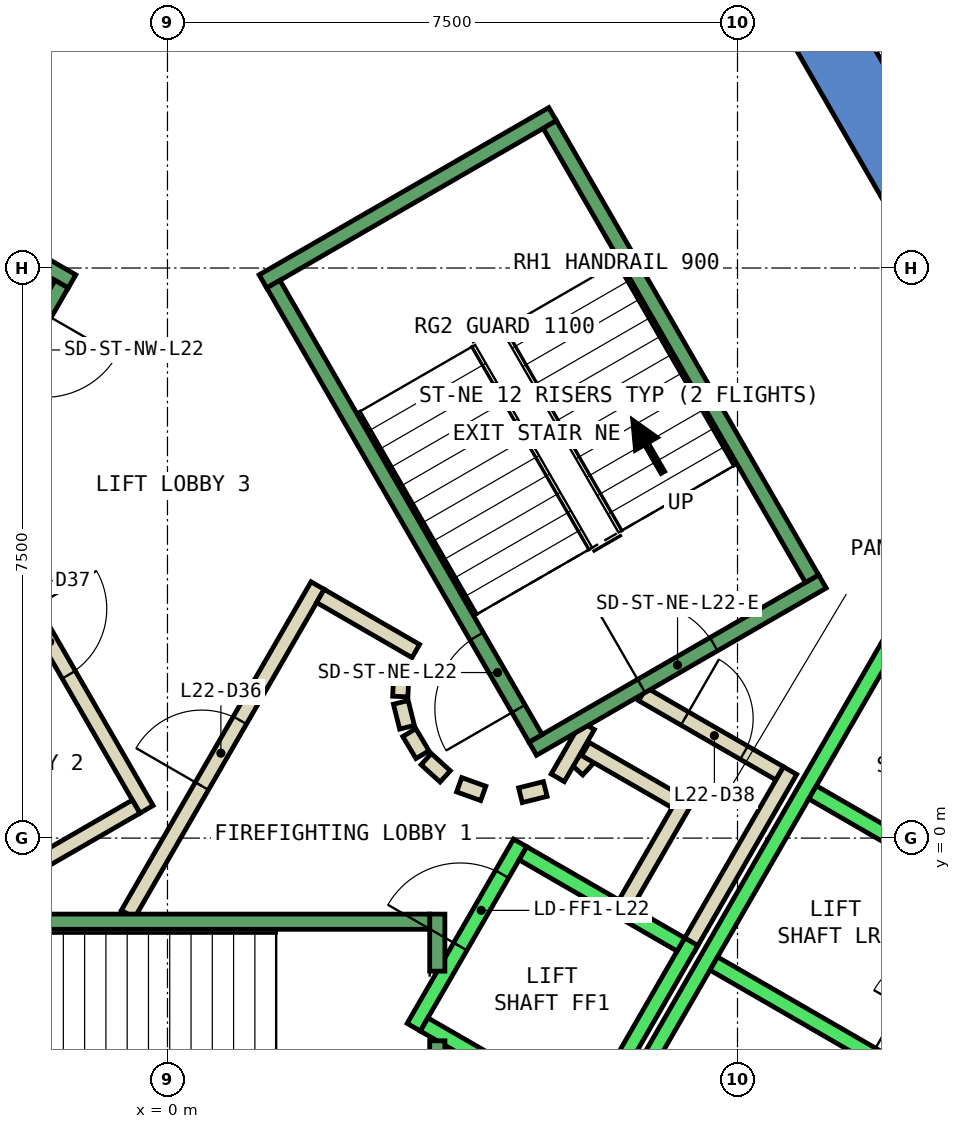
"""IFC4 building model, lengths in metres.
Left out: names, types, materials, properties, quantities, classifications, styles, units other than length and angle.
Written with IfcOpenShell. Run it as: python <this file> out.ifc"""

import sys

from ifc_helpers import new_model, si_unit, direction, frame, frame_2d, origin, place, context, subcontext, project, spatial, polyline, rectangle, outline, extrude, element, fill, save


model = new_model("IFC4")
c1 = context("Model", 3, precision=1e-05, world=origin(), true_north=direction((0.0, 1.0)))
c2 = subcontext(c1, "Body", "Model", "MODEL_VIEW")
j1 = project(units=[si_unit("LENGTHUNIT", "METRE"), si_unit("PLANEANGLEUNIT", "RADIAN")], contexts=[c1])
p1 = place(None, origin())
s1 = spatial("IfcSite", under=j1, at=p1, CompositionType="ELEMENT")
p2 = place(p1, origin())
s2 = spatial("IfcBuilding", under=s1, at=p2, CompositionType="ELEMENT")
p3 = place(p2, frame((0.0, 0.0, 103.4)))
s3 = spatial("IfcBuildingStorey", under=s2, at=p3, CompositionType="ELEMENT", Elevation=103.4)
p4 = place(p3, frame((0.0, 0.0, -0.4)))
e1 = element("IfcWall", 1, at=p4, inside=s3, PredefinedType="SHEAR", context=c2, shape_type="SweptSolid", body=[
    extrude(outline(polyline([(8.517, 11.748), (7.738, 11.298), (12.817, 2.5), (13.856, 2.5), (8.517, 11.748)])), origin(), (0.0, 0.0, 1.0), 4.2),
])
p5 = place(p3, frame((0.0, 0.0, -0.4)))
e2 = element("IfcWall", 2, at=p5, inside=s3, PredefinedType="SHEAR", context=c2, shape_type="SweptSolid", body=[
    extrude(outline(polyline([(10.717, -2.937), (9.938, -2.487), (9.288, -3.613), (10.067, -4.063), (10.717, -2.937)])), origin(), (0.0, 0.0, 1.0), 4.2),
])
p6 = place(p3, frame((5.39, 0.898, 0.0), z_axis=(0.0, 0.0, 1.0), x_axis=(0.673828488714, 0.738887791073, 0.0)))
e3 = element("IfcWall", 3, at=p6, inside=s3, PredefinedType="PARTITIONING", context=c2, shape_type="SweptSolid", body=[
    extrude(rectangle(XDim=0.263, YDim=0.2, at=frame_2d((0.131, 0.0))), origin(), (0.0, 0.0, 1.0), 3.8),
])
p7 = place(p3, frame((5.499, 1.172, 0.0), z_axis=(0.0, 0.0, 1.0), x_axis=(0.866333505267, -0.499465972466, 0.0)))
e4 = element("IfcWall", 4, at=p7, inside=s3, PredefinedType="PARTITIONING", context=c2, shape_type="SweptSolid", body=[
    extrude(rectangle(XDim=1.374, YDim=0.2, at=frame_2d((0.687, 0.0))), origin(), (0.0, 0.0, 1.0), 3.8),
])
p8 = place(p3, frame((6.826, 0.522, 0.0), z_axis=(0.0, 0.0, 1.0), x_axis=(-0.500016722714, -0.866015748706, 0.0)))
e5 = element("IfcWall", 5, at=p8, inside=s3, PredefinedType="PARTITIONING", context=c2, shape_type="SweptSolid", body=[
    extrude(rectangle(XDim=1.7, YDim=0.2, at=frame_2d((0.85, 0.0))), origin(), (0.0, 0.0, 1.0), 3.8),
])
p9 = place(p3, frame((6.25, 1.894, 0.0), z_axis=(0.0, 0.0, 1.0), x_axis=(0.866043184279, -0.499969202016, 0.0)))
e6 = element("IfcWall", 6, at=p9, inside=s3, PredefinedType="PARTITIONING", context=c2, shape_type="SweptSolid", body=[
    extrude(rectangle(XDim=2.084, YDim=0.2, at=frame_2d((1.042, 0.0))), origin(), (0.0, 0.0, 1.0), 3.8),
])
p10 = place(p9, frame((0.642, 0.0, 0.0)))
e7 = element("IfcOpeningElement", 7, at=p10, cuts=e6, PredefinedType="OPENING", context=c2, shape_type="SweptSolid", body=[
    extrude(rectangle(XDim=0.9, YDim=2.1, at=frame_2d((0.45, 1.05))), frame((0.0, 0.11, 0.0), z_axis=(0.0, -1.0, 0.0), x_axis=(1.0, 0.0, 0.0)), (0.0, 0.0, 1.0), 0.22),
])
p11 = place(p3, frame((8.192, 0.888, 0.0), z_axis=(0.0, 0.0, 1.0), x_axis=(-0.499940625693, -0.866059680843, 0.0)))
e8 = element("IfcWall", 8, at=p11, inside=s3, PredefinedType="PARTITIONING", context=c2, shape_type="SweptSolid", body=[
    extrude(rectangle(XDim=2.68, YDim=0.2, at=frame_2d((1.34, 0.0))), origin(), (0.0, 0.0, 1.0), 3.8),
])
p12 = place(p3, frame((5.135, 0.793, 0.0), z_axis=(0.0, 0.0, 1.0), x_axis=(0.499526442893, 0.866298639529, 0.0)))
e9 = element("IfcWall", 9, at=p12, inside=s3, PredefinedType="PARTITIONING", context=c2, shape_type="SweptSolid", body=[
    extrude(rectangle(XDim=0.791, YDim=0.2, at=frame_2d((0.396, 0.0))), origin(), (0.0, 0.0, 1.0), 3.8),
])
p13 = place(p3, frame((-0.52, -1.0, 0.0), z_axis=(0.0, 0.0, 1.0), x_axis=(0.50011622646, 0.865958290007, 0.0)))
e10 = element("IfcWall", 10, at=p13, inside=s3, PredefinedType="PARTITIONING", context=c2, shape_type="SweptSolid", body=[
    extrude(rectangle(XDim=4.991, YDim=0.2, at=frame_2d((2.496, 0.0))), origin(), (0.0, 0.0, 1.0), 3.8),
])
p14 = place(p13, frame((1.945, 0.0, 0.0)))
e11 = element("IfcOpeningElement", 11, at=p14, cuts=e10, PredefinedType="OPENING", context=c2, shape_type="SweptSolid", body=[
    extrude(rectangle(XDim=1.0, YDim=2.1, at=frame_2d((0.5, 1.05))), frame((0.0, 0.11, 0.0), z_axis=(0.0, -1.0, 0.0), x_axis=(1.0, 0.0, 0.0)), (0.0, 0.0, 1.0), 0.22),
])
p15 = place(p3, frame((2.012, 3.186, 0.0), z_axis=(0.0, 0.0, 1.0), x_axis=(0.865891012941, -0.500232699559, 0.0)))
e12 = element("IfcWall", 12, at=p15, inside=s3, PredefinedType="PARTITIONING", context=c2, shape_type="SweptSolid", body=[
    extrude(rectangle(XDim=1.449, YDim=0.2, at=frame_2d((0.725, 0.0))), origin(), (0.0, 0.0, 1.0), 3.8),
])
p16 = place(p3, frame((3.079, 2.199, 0.0), z_axis=(0.0, 0.0, 1.0), x_axis=(-0.047771483479, -0.998858290933, 0.0)))
e13 = element("IfcWall", 13, at=p16, inside=s3, PredefinedType="PARTITIONING", context=c2, shape_type="SweptSolid", body=[
    extrude(rectangle(XDim=0.337, YDim=0.2, at=frame_2d((0.169, 0.0))), origin(), (0.0, 0.0, 1.0), 3.8),
])
p17 = place(p3, frame((3.07, 1.786, 0.0), z_axis=(0.0, 0.0, 1.0), x_axis=(0.242705583207, -0.970099994784, 0.0)))
e14 = element("IfcWall", 14, at=p17, inside=s3, PredefinedType="PARTITIONING", context=c2, shape_type="SweptSolid", body=[
    extrude(rectangle(XDim=0.338, YDim=0.2, at=frame_2d((0.169, 0.0))), origin(), (0.0, 0.0, 1.0), 3.8),
])
for number, where, z_axis, x_axis in (
    (15, (3.182, 1.388, 0.0), (0.0, 0.0, 1.0), (0.512, -0.859, 0.0)),
    (16, (3.404, 1.039, 0.0), (0.0, 0.0, 1.0), (0.74, -0.672, 0.0)),
):
    element("IfcWall", number, at=place(p3, frame(where, z_axis=z_axis, x_axis=x_axis)), inside=s3, PredefinedType="PARTITIONING", context=c2, shape_type="SweptSolid", body=[
        extrude(rectangle(XDim=0.338, YDim=0.2, at=frame_2d((0.169, 0.0))), origin(), (0.0, 0.0, 1.0), 3.8),
    ])
p18 = place(p3, frame((3.838, 0.702, 0.0), z_axis=(0.0, 0.0, 1.0), x_axis=(0.941035081519, -0.338308993895, 0.0)))
e17 = element("IfcWall", 17, at=p18, inside=s3, PredefinedType="PARTITIONING", context=c2, shape_type="SweptSolid", body=[
    extrude(rectangle(XDim=0.337, YDim=0.2, at=frame_2d((0.168, 0.0))), origin(), (0.0, 0.0, 1.0), 3.8),
])
p19 = place(p3, frame((4.644, 0.564, 0.0), z_axis=(0.0, 0.0, 1.0), x_axis=(0.969929076366, 0.243387729394, 0.0)))
e18 = element("IfcWall", 18, at=p19, inside=s3, PredefinedType="PARTITIONING", context=c2, shape_type="SweptSolid", body=[
    extrude(rectangle(XDim=0.337, YDim=0.2, at=frame_2d((0.168, 0.0))), origin(), (0.0, 0.0, 1.0), 3.8),
])
p20 = place(p3, frame((-2.771, 4.7, 0.0), z_axis=(0.0, 0.0, 1.0), x_axis=(0.499969479948, -0.866043023828, 0.0)))
e19 = element("IfcWall", 19, at=p20, inside=s3, PredefinedType="PARTITIONING", context=c2, shape_type="SweptSolid", body=[
    extrude(rectangle(XDim=4.99, YDim=0.2, at=frame_2d((2.495, 0.0))), origin(), (0.0, 0.0, 1.0), 3.8),
])
p21 = place(p20, frame((1.945, 0.0, 0.0)))
e20 = element("IfcOpeningElement", 20, at=p21, cuts=e19, PredefinedType="OPENING", context=c2, shape_type="SweptSolid", body=[
    extrude(rectangle(XDim=1.0, YDim=2.1, at=frame_2d((0.5, 1.05))), frame((0.0, 0.11, 0.0), z_axis=(0.0, -1.0, 0.0), x_axis=(1.0, 0.0, 0.0)), (0.0, 0.0, 1.0), 0.22),
])
p22 = place(p3, frame((-0.412, 0.414, 0.0), z_axis=(0.0, 0.0, 1.0), x_axis=(-0.866017369001, -0.500013916395, 0.0)))
e21 = element("IfcWall", 21, at=p22, inside=s3, PredefinedType="PARTITIONING", context=c2, shape_type="SweptSolid", body=[
    extrude(rectangle(XDim=1.45, YDim=0.2, at=frame_2d((0.725, 0.0))), origin(), (0.0, 0.0, 1.0), 3.8),
])
p23 = place(p3, frame((3.24, -2.488, 0.0), z_axis=(0.0, 0.0, 1.0), x_axis=(0.49994636267, 0.866056369097, 0.0)))
e22 = element("IfcWall", 22, at=p23, inside=s3, PredefinedType="STANDARD", context=c2, shape_type="SweptSolid", body=[
    extrude(rectangle(XDim=2.8, YDim=0.2, at=frame_2d((1.4, 0.0))), origin(), (0.0, 0.0, 1.0), 3.8),
])
p24 = place(p23, frame((1.225, 0.0, 0.0)))
e23 = element("IfcOpeningElement", 23, at=p24, cuts=e22, PredefinedType="OPENING", context=c2, shape_type="SweptSolid", body=[
    extrude(rectangle(XDim=1.1, YDim=2.1, at=frame_2d((0.55, 1.05))), frame((0.0, 0.11, 0.0), z_axis=(0.0, -1.0, 0.0), x_axis=(1.0, 0.0, 0.0)), (0.0, 0.0, 1.0), 0.22),
])
p25 = place(p3, frame((5.492, -3.788, 0.0), z_axis=(0.0, 0.0, 1.0), x_axis=(0.500011755427, 0.866018616679, 0.0)))
e24 = element("IfcWall", 24, at=p25, inside=s3, PredefinedType="STANDARD", context=c2, shape_type="SweptSolid", body=[
    extrude(rectangle(XDim=2.8, YDim=0.2, at=frame_2d((1.4, 0.0))), origin(), (0.0, 0.0, 1.0), 3.8),
])
p26 = place(p3, frame((3.377, -2.452, 0.0), z_axis=(0.0, 0.0, 1.0), x_axis=(0.865955154139, -0.50012165622, 0.0)))
e25 = element("IfcWall", 25, at=p26, inside=s3, PredefinedType="STANDARD", context=c2, shape_type="SweptSolid", body=[
    extrude(rectangle(XDim=2.4, YDim=0.2, at=frame_2d((1.2, 0.0))), origin(), (0.0, 0.0, 1.0), 3.8),
])
p27 = place(p3, frame((4.677, -0.2, 0.0), z_axis=(0.0, 0.0, 1.0), x_axis=(0.865973769406, -0.500089422704, 0.0)))
e26 = element("IfcWall", 26, at=p27, inside=s3, PredefinedType="STANDARD", context=c2, shape_type="SweptSolid", body=[
    extrude(rectangle(XDim=2.399, YDim=0.2, at=frame_2d((1.2, 0.0))), origin(), (0.0, 0.0, 1.0), 3.8),
])
p28 = place(p3, frame((4.451, -6.19, 0.0), z_axis=(0.0, 0.0, 1.0), x_axis=(0.50000090737, 0.866024879913, 0.0)))
e27 = element("IfcWall", 27, at=p28, inside=s3, PredefinedType="STANDARD", context=c2, shape_type="SweptSolid", body=[
    extrude(rectangle(XDim=10.6, YDim=0.2, at=frame_2d((5.3, 0.0))), origin(), (0.0, 0.0, 1.0), 3.8),
])
for number, where, z_axis, x_axis in (
    (28, (7.188, -1.65, 0.0), (0.0, 0.0, 1.0), (0.866, -0.5, 0.0)),
    (29, (8.488, 0.602, 0.0), (0.0, 0.0, 1.0), (0.866, -0.5, 0.0)),
):
    element("IfcWall", number, at=place(p3, frame(where, z_axis=z_axis, x_axis=x_axis)), inside=s3, PredefinedType="STANDARD", context=c2, shape_type="SweptSolid", body=[
        extrude(rectangle(XDim=2.5, YDim=0.2, at=frame_2d((1.25, 0.0))), origin(), (0.0, 0.0, 1.0), 3.8),
    ])
p29 = place(p3, frame((3.55, -2.667, 0.0), z_axis=(0.0, 0.0, 1.0), x_axis=(0.0, -1.0, 0.0)))
e30 = element("IfcWall", 30, at=p29, inside=s3, PredefinedType="STANDARD", context=c2, shape_type="SweptSolid", body=[
    extrude(rectangle(XDim=2.733, YDim=0.2, at=frame_2d((1.366, 0.0))), origin(), (0.0, 0.0, 1.0), 3.8),
])
p30 = place(p3, frame((3.55, -1.0, 0.0), z_axis=(0.0, 0.0, 1.0), x_axis=(0.0, -1.0, 0.0)))
e31 = element("IfcWall", 31, at=p30, inside=s3, PredefinedType="STANDARD", context=c2, shape_type="SweptSolid", body=[
    extrude(rectangle(XDim=0.751, YDim=0.2, at=frame_2d((0.375, 0.0))), origin(), (0.0, 0.0, 1.0), 3.8),
])
p31 = place(p3, frame((-3.45, -1.1, 0.0), z_axis=(0.0, 0.0, 1.0), x_axis=(1.0, 0.0, 0.0)))
e32 = element("IfcWall", 32, at=p31, inside=s3, PredefinedType="STANDARD", context=c2, shape_type="SweptSolid", body=[
    extrude(rectangle(XDim=6.9, YDim=0.2, at=frame_2d((3.45, 0.0))), origin(), (0.0, 0.0, 1.0), 3.8),
])
p32 = place(p31, frame((0.45, 0.0, 0.0)))
e33 = element("IfcOpeningElement", 33, at=p32, cuts=e32, PredefinedType="OPENING", context=c2, shape_type="SweptSolid", body=[
    extrude(rectangle(XDim=1.1, YDim=2.2, at=frame_2d((0.55, 1.1))), frame((0.0, 0.11, 0.0), z_axis=(0.0, -1.0, 0.0), x_axis=(1.0, 0.0, 0.0)), (0.0, 0.0, 1.0), 0.22),
])
p33 = place(p3, frame((4.806, 1.176, 0.0), z_axis=(0.0, 0.0, 1.0), x_axis=(0.866059941101, 0.499940174841, 0.0)))
e34 = element("IfcWall", 34, at=p33, inside=s3, PredefinedType="STANDARD", context=c2, shape_type="SweptSolid", body=[
    extrude(rectangle(XDim=4.4, YDim=0.2, at=frame_2d((2.2, 0.0))), origin(), (0.0, 0.0, 1.0), 3.8),
])
p34 = place(p33, frame((1.65, 0.0, 0.0)))
e35 = element("IfcOpeningElement", 35, at=p34, cuts=e34, PredefinedType="OPENING", context=c2, shape_type="SweptSolid", body=[
    extrude(rectangle(XDim=1.1, YDim=2.2, at=frame_2d((0.55, 1.1))), frame((0.0, 0.11, 0.0), z_axis=(0.0, -1.0, 0.0), x_axis=(1.0, 0.0, 0.0)), (0.0, 0.0, 1.0), 0.22),
])
p35 = place(p3, frame((1.256, 7.324, 0.0), z_axis=(0.0, 0.0, 1.0), x_axis=(0.866046073146, 0.499964197906, 0.0)))
e36 = element("IfcWall", 36, at=p35, inside=s3, PredefinedType="STANDARD", context=c2, shape_type="SweptSolid", body=[
    extrude(rectangle(XDim=4.4, YDim=0.2, at=frame_2d((2.2, 0.0))), origin(), (0.0, 0.0, 1.0), 3.8),
])
p36 = place(p3, frame((4.843, 1.312, 0.0), z_axis=(0.0, 0.0, 1.0), x_axis=(-0.499963383562, 0.866046543262, 0.0)))
e37 = element("IfcWall", 37, at=p36, inside=s3, PredefinedType="STANDARD", context=c2, shape_type="SweptSolid", body=[
    extrude(rectangle(XDim=6.9, YDim=0.2, at=frame_2d((3.45, 0.0))), origin(), (0.0, 0.0, 1.0), 3.8),
])
p37 = place(p36, frame((0.45, 0.0, 0.0)))
e38 = element("IfcOpeningElement", 38, at=p37, cuts=e37, PredefinedType="OPENING", context=c2, shape_type="SweptSolid", body=[
    extrude(rectangle(XDim=1.1, YDim=2.2, at=frame_2d((0.55, 1.1))), frame((0.0, 0.11, 0.0), z_axis=(0.0, -1.0, 0.0), x_axis=(1.0, 0.0, 0.0)), (0.0, 0.0, 1.0), 0.22),
])
p38 = place(p3, frame((8.48, 3.412, 0.0), z_axis=(0.0, 0.0, 1.0), x_axis=(-0.499978703459, 0.866037698999, 0.0)))
e39 = element("IfcWall", 39, at=p38, inside=s3, PredefinedType="STANDARD", context=c2, shape_type="SweptSolid", body=[
    extrude(rectangle(XDim=6.9, YDim=0.2, at=frame_2d((3.45, 0.0))), origin(), (0.0, 0.0, 1.0), 3.8),
])
p39 = place(p3, frame((-1.256, 7.324, 0.0), z_axis=(0.0, 0.0, 1.0), x_axis=(-0.866046073146, 0.499964197906, 0.0)))
e40 = element("IfcWall", 40, at=p39, inside=s3, PredefinedType="STANDARD", context=c2, shape_type="SweptSolid", body=[
    extrude(rectangle(XDim=4.4, YDim=0.2, at=frame_2d((2.2, 0.0))), origin(), (0.0, 0.0, 1.0), 3.8),
])
p40 = place(p39, frame((1.65, 0.0, 0.0)))
e41 = element("IfcOpeningElement", 41, at=p40, cuts=e40, PredefinedType="OPENING", context=c2, shape_type="SweptSolid", body=[
    extrude(rectangle(XDim=1.1, YDim=2.2, at=frame_2d((0.55, 1.1))), frame((0.0, 0.11, 0.0), z_axis=(0.0, -1.0, 0.0), x_axis=(1.0, 0.0, 0.0)), (0.0, 0.0, 1.0), 0.22),
])
p41 = place(p3, frame((-1.393, 7.288, 0.0), z_axis=(0.0, 0.0, 1.0), x_axis=(-0.499963383562, -0.866046543262, 0.0)))
e42 = element("IfcWall", 42, at=p41, inside=s3, PredefinedType="STANDARD", context=c2, shape_type="SweptSolid", body=[
    extrude(rectangle(XDim=6.9, YDim=0.2, at=frame_2d((3.45, 0.0))), origin(), (0.0, 0.0, 1.0), 3.8),
])
p42 = place(p41, frame((0.45, 0.0, 0.0)))
e43 = element("IfcOpeningElement", 43, at=p42, cuts=e42, PredefinedType="OPENING", context=c2, shape_type="SweptSolid", body=[
    extrude(rectangle(XDim=1.1, YDim=2.2, at=frame_2d((0.55, 1.1))), frame((0.0, 0.11, 0.0), z_axis=(0.0, -1.0, 0.0), x_axis=(1.0, 0.0, 0.0)), (0.0, 0.0, 1.0), 0.22),
])
p43 = place(p14, origin())
e44 = element("IfcDoor", 44, at=p43, inside=s3, OperationType="SINGLE_SWING_LEFT", PredefinedType="DOOR", context=c2, shape_type="SweptSolid", body=[
    extrude(rectangle(XDim=1.0, YDim=2.1, at=frame_2d((0.5, 1.05))), frame((0.0, 0.025, 0.0), z_axis=(0.0, -1.0, 0.0), x_axis=(1.0, 0.0, 0.0)), (0.0, 0.0, 1.0), 0.05),
])
fill(e11, e44)
p44 = place(p21, origin())
e45 = element("IfcDoor", 45, at=p44, inside=s3, OperationType="SINGLE_SWING_RIGHT", PredefinedType="DOOR", context=c2, shape_type="SweptSolid", body=[
    extrude(rectangle(XDim=1.0, YDim=2.1, at=frame_2d((0.5, 1.05))), frame((0.0, 0.025, 0.0), z_axis=(0.0, -1.0, 0.0), x_axis=(1.0, 0.0, 0.0)), (0.0, 0.0, 1.0), 0.05),
])
fill(e20, e45)
p45 = place(p10, origin())
e46 = element("IfcDoor", 46, at=p45, inside=s3, OperationType="SINGLE_SWING_LEFT", PredefinedType="DOOR", context=c2, shape_type="SweptSolid", body=[
    extrude(rectangle(XDim=0.9, YDim=2.1, at=frame_2d((0.45, 1.05))), frame((0.0, 0.025, 0.0), z_axis=(0.0, -1.0, 0.0), x_axis=(1.0, 0.0, 0.0)), (0.0, 0.0, 1.0), 0.05),
])
fill(e7, e46)
p46 = place(p24, origin())
e47 = element("IfcDoor", 47, at=p46, inside=s3, OperationType="SLIDING_TO_LEFT", PredefinedType="DOOR", context=c2, shape_type="SweptSolid", body=[
    extrude(rectangle(XDim=1.1, YDim=2.1, at=frame_2d((0.55, 1.05))), frame((0.0, 0.025, 0.0), z_axis=(0.0, -1.0, 0.0), x_axis=(1.0, 0.0, 0.0)), (0.0, 0.0, 1.0), 0.05),
])
fill(e23, e47)
p47 = place(p37, origin())
e48 = element("IfcDoor", 48, at=p47, inside=s3, OperationType="SINGLE_SWING_LEFT", PredefinedType="DOOR", context=c2, shape_type="SweptSolid", body=[
    extrude(rectangle(XDim=1.1, YDim=2.2, at=frame_2d((0.55, 1.1))), frame((0.0, 0.025, 0.0), z_axis=(0.0, -1.0, 0.0), x_axis=(1.0, 0.0, 0.0)), (0.0, 0.0, 1.0), 0.05),
])
fill(e38, e48)
p48 = place(p34, origin())
e49 = element("IfcDoor", 49, at=p48, inside=s3, OperationType="SINGLE_SWING_LEFT", PredefinedType="DOOR", context=c2, shape_type="SweptSolid", body=[
    extrude(rectangle(XDim=1.1, YDim=2.2, at=frame_2d((0.55, 1.1))), frame((0.0, 0.025, 0.0), z_axis=(0.0, -1.0, 0.0), x_axis=(1.0, 0.0, 0.0)), (0.0, 0.0, 1.0), 0.05),
])
fill(e35, e49)
save(model, sys.argv[1])
